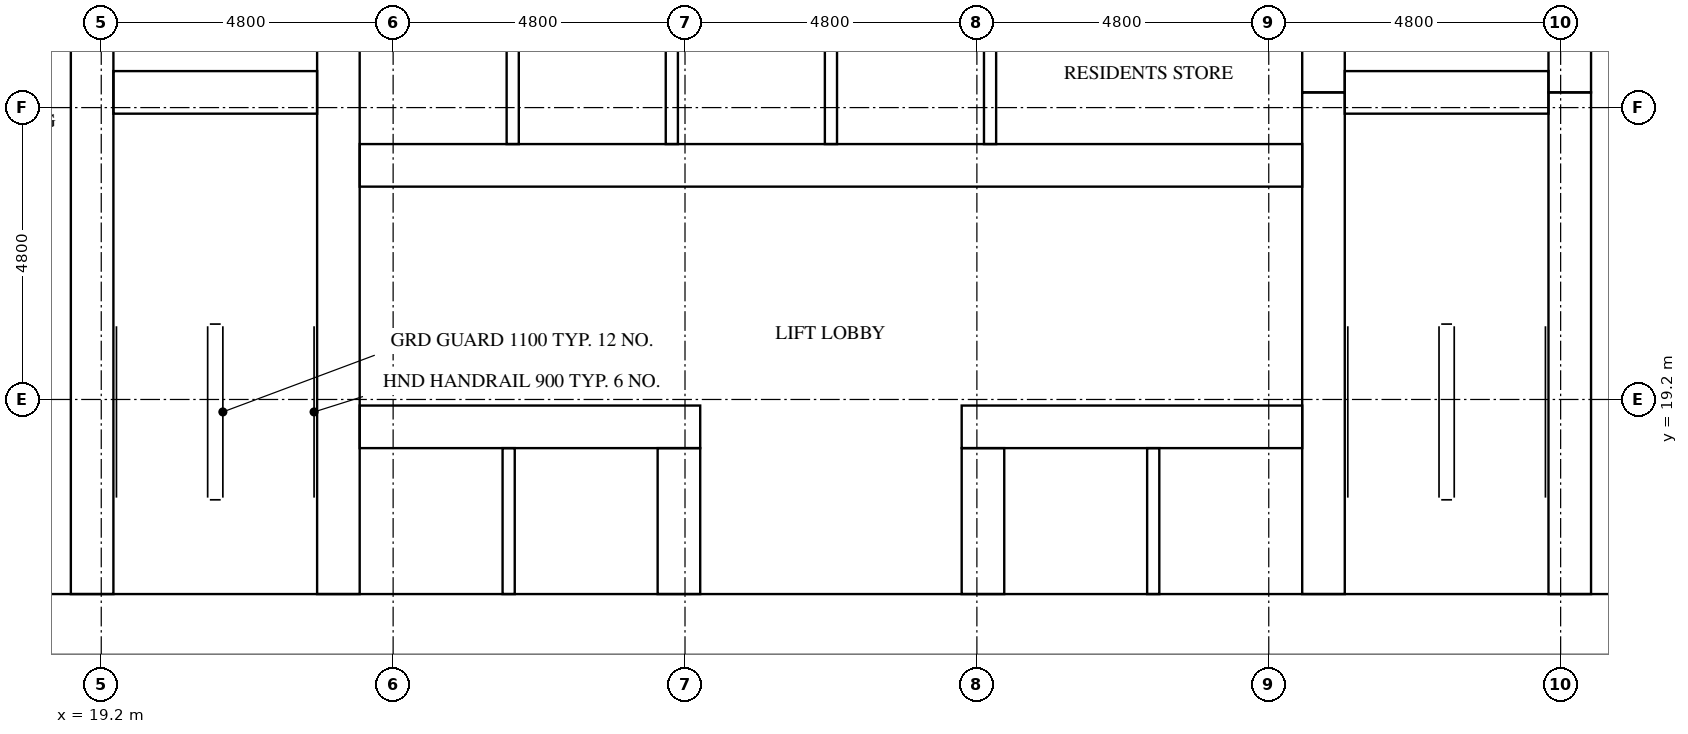
"""IFC4 building model, lengths in metres.
Left out: names, types, materials, properties, quantities, classifications, styles, units other than length and angle.
Written with IfcOpenShell. Run it as: python <this file> out.ifc"""

import sys

from ifc_helpers import new_model, si_unit, direction, frame, frame_2d, origin, place, context, subcontext, project, spatial, rectangle, extrude, element, fill, save


model = new_model("IFC4")
c1 = context("Model", 3, precision=1e-05, world=origin(), true_north=direction((0.0, 1.0)))
c2 = subcontext(c1, "Body", "Model", "MODEL_VIEW")
j1 = project(units=[si_unit("LENGTHUNIT", "METRE"), si_unit("PLANEANGLEUNIT", "RADIAN")], contexts=[c1])
p1 = place(None, origin())
s1 = spatial("IfcSite", under=j1, at=p1, CompositionType="ELEMENT")
p2 = place(p1, origin())
s2 = spatial("IfcBuilding", under=s1, at=p2, CompositionType="ELEMENT")
p3 = place(p2, frame((0.0, 0.0, 29.4)))
s3 = spatial("IfcBuildingStorey", under=s2, at=p3, CompositionType="ELEMENT", Elevation=29.4)
p4 = place(p3, frame((15.0, 15.5, 0.0), z_axis=(0.0, 0.0, 1.0), x_axis=(1.0, 0.0, 0.0)))
e1 = element("IfcWall", 1, at=p4, inside=s3, PredefinedType="SHEAR", context=c2, shape_type="SweptSolid", body=[
    extrude(rectangle(XDim=32.4, YDim=1.0, at=frame_2d((16.2, 0.0))), origin(), (0.0, 0.0, 1.0), 3.2),
])
p5 = place(p4, frame((15.3, 0.0, 0.0)))
e2 = element("IfcOpeningElement", 2, at=p5, cuts=e1, PredefinedType="OPENING", context=c2, shape_type="SweptSolid", body=[
    extrude(rectangle(XDim=1.8, YDim=2.1, at=frame_2d((0.9, 1.05))), frame((0.0, 0.51, 0.0), z_axis=(0.0, -1.0, 0.0), x_axis=(1.0, 0.0, 0.0)), (0.0, 0.0, 1.0), 1.02),
])
p6 = place(p3, frame((19.05, 16.0, 0.0), z_axis=(0.0, 0.0, 1.0), x_axis=(0.0, 1.0, 0.0)))
e3 = element("IfcWall", 3, at=p6, inside=s3, PredefinedType="SHEAR", context=c2, shape_type="SweptSolid", body=[
    extrude(rectangle(XDim=14.9, YDim=0.7, at=frame_2d((7.45, 0.0))), origin(), (0.0, 0.0, 1.0), 3.2),
])
p7 = place(p6, frame((9.45, 0.0, 0.0)))
e4 = element("IfcOpeningElement", 4, at=p7, cuts=e3, PredefinedType="OPENING", context=c2, shape_type="SweptSolid", body=[
    extrude(rectangle(XDim=1.1, YDim=2.1, at=frame_2d((0.55, 1.05))), frame((0.0, 0.36, 0.0), z_axis=(0.0, -1.0, 0.0), x_axis=(1.0, 0.0, 0.0)), (0.0, 0.0, 1.0), 0.72),
])
p8 = place(p6, frame((12.95, 0.0, 0.0)))
e5 = element("IfcOpeningElement", 5, at=p8, cuts=e3, PredefinedType="OPENING", context=c2, shape_type="SweptSolid", body=[
    extrude(rectangle(XDim=1.1, YDim=2.1, at=frame_2d((0.55, 1.05))), frame((0.0, 0.36, 0.0), z_axis=(0.0, -1.0, 0.0), x_axis=(1.0, 0.0, 0.0)), (0.0, 0.0, 1.0), 0.72),
])
p9 = place(p6, frame((0.2, 0.0, 0.0)))
e6 = element("IfcOpeningElement", 6, at=p9, cuts=e3, PredefinedType="OPENING", context=c2, shape_type="SweptSolid", body=[
    extrude(rectangle(XDim=1.2, YDim=2.1, at=frame_2d((0.6, 1.05))), frame((0.0, 0.36, 0.0), z_axis=(0.0, -1.0, 0.0), x_axis=(1.0, 0.0, 0.0)), (0.0, 0.0, 1.0), 0.72),
])
p10 = place(p3, frame((23.1, 16.0, 0.0), z_axis=(0.0, 0.0, 1.0), x_axis=(0.0, 1.0, 0.0)))
e7 = element("IfcWall", 7, at=p10, inside=s3, PredefinedType="SHEAR", context=c2, shape_type="SweptSolid", body=[
    extrude(rectangle(XDim=20.8, YDim=0.7, at=frame_2d((10.4, 0.0))), origin(), (0.0, 0.0, 1.0), 3.2),
])
p11 = place(p3, frame((39.3, 16.0, 0.0), z_axis=(0.0, 0.0, 1.0), x_axis=(0.0, 1.0, 0.0)))
e8 = element("IfcWall", 8, at=p11, inside=s3, PredefinedType="SHEAR", context=c2, shape_type="SweptSolid", body=[
    extrude(rectangle(XDim=8.25, YDim=0.7, at=frame_2d((4.125, 0.0))), origin(), (0.0, 0.0, 1.0), 3.2),
])
p12 = place(p3, frame((39.3, 24.25, 0.0), z_axis=(0.0, 0.0, 1.0), x_axis=(0.0, 1.0, 0.0)))
e9 = element("IfcWall", 9, at=p12, inside=s3, PredefinedType="SHEAR", context=c2, shape_type="SweptSolid", body=[
    extrude(rectangle(XDim=3.5, YDim=0.7, at=frame_2d((1.75, 0.0))), origin(), (0.0, 0.0, 1.0), 3.2),
])
p13 = place(p3, frame((43.35, 16.0, 0.0), z_axis=(0.0, 0.0, 1.0), x_axis=(0.0, 1.0, 0.0)))
e10 = element("IfcWall", 10, at=p13, inside=s3, PredefinedType="SHEAR", context=c2, shape_type="SweptSolid", body=[
    extrude(rectangle(XDim=8.25, YDim=0.7, at=frame_2d((4.125, 0.0))), origin(), (0.0, 0.0, 1.0), 3.2),
])
p14 = place(p13, frame((0.2, 0.0, 0.0)))
e11 = element("IfcOpeningElement", 11, at=p14, cuts=e10, PredefinedType="OPENING", context=c2, shape_type="SweptSolid", body=[
    extrude(rectangle(XDim=1.2, YDim=2.1, at=frame_2d((0.6, 1.05))), frame((0.0, 0.36, 0.0), z_axis=(0.0, -1.0, 0.0), x_axis=(1.0, 0.0, 0.0)), (0.0, 0.0, 1.0), 0.72),
])
p15 = place(p3, frame((43.35, 24.25, 0.0), z_axis=(0.0, 0.0, 1.0), x_axis=(0.0, 1.0, 0.0)))
e12 = element("IfcWall", 12, at=p15, inside=s3, PredefinedType="SHEAR", context=c2, shape_type="SweptSolid", body=[
    extrude(rectangle(XDim=3.5, YDim=0.7, at=frame_2d((1.75, 0.0))), origin(), (0.0, 0.0, 1.0), 3.2),
])
p16 = place(p15, frame((1.2, 0.0, 0.0)))
e13 = element("IfcOpeningElement", 13, at=p16, cuts=e12, PredefinedType="OPENING", context=c2, shape_type="SweptSolid", body=[
    extrude(rectangle(XDim=1.1, YDim=2.1, at=frame_2d((0.55, 1.05))), frame((0.0, 0.36, 0.0), z_axis=(0.0, -1.0, 0.0), x_axis=(1.0, 0.0, 0.0)), (0.0, 0.0, 1.0), 0.72),
])
for number, where, z_axis, x_axis in (
    (14, (19.4, 24.25, 0.0), (0.0, 0.0, 1.0), (1.0, 0.0, 0.0)),
    (15, (39.65, 24.25, 0.0), (0.0, 0.0, 1.0), (1.0, 0.0, 0.0)),
):
    element("IfcWall", number, at=place(p3, frame(where, z_axis=z_axis, x_axis=x_axis)), inside=s3, PredefinedType="SHEAR", context=c2, shape_type="SweptSolid", body=[
        extrude(rectangle(XDim=3.35, YDim=0.7, at=frame_2d((1.675, 0.0))), origin(), (0.0, 0.0, 1.0), 3.2),
    ])
p17 = place(p3, frame((23.45, 18.75, 0.0), z_axis=(0.0, 0.0, 1.0), x_axis=(1.0, 0.0, 0.0)))
e16 = element("IfcWall", 16, at=p17, inside=s3, PredefinedType="SHEAR", context=c2, shape_type="SweptSolid", body=[
    extrude(rectangle(XDim=5.6, YDim=0.7, at=frame_2d((2.8, 0.0))), origin(), (0.0, 0.0, 1.0), 3.2),
])
p18 = place(p17, frame((0.625, 0.0, 0.0)))
e17 = element("IfcOpeningElement", 17, at=p18, cuts=e16, PredefinedType="OPENING", context=c2, shape_type="SweptSolid", body=[
    extrude(rectangle(XDim=1.1, YDim=2.1, at=frame_2d((0.55, 1.05))), frame((0.0, 0.36, 0.0), z_axis=(0.0, -1.0, 0.0), x_axis=(1.0, 0.0, 0.0)), (0.0, 0.0, 1.0), 0.72),
])
p19 = place(p17, frame((3.175, 0.0, 0.0)))
e18 = element("IfcOpeningElement", 18, at=p19, cuts=e16, PredefinedType="OPENING", context=c2, shape_type="SweptSolid", body=[
    extrude(rectangle(XDim=1.1, YDim=2.1, at=frame_2d((0.55, 1.05))), frame((0.0, 0.36, 0.0), z_axis=(0.0, -1.0, 0.0), x_axis=(1.0, 0.0, 0.0)), (0.0, 0.0, 1.0), 0.72),
])
p20 = place(p3, frame((33.35, 18.75, 0.0), z_axis=(0.0, 0.0, 1.0), x_axis=(1.0, 0.0, 0.0)))
e19 = element("IfcWall", 19, at=p20, inside=s3, PredefinedType="SHEAR", context=c2, shape_type="SweptSolid", body=[
    extrude(rectangle(XDim=5.6, YDim=0.7, at=frame_2d((2.8, 0.0))), origin(), (0.0, 0.0, 1.0), 3.2),
])
p21 = place(p20, frame((1.325, 0.0, 0.0)))
e20 = element("IfcOpeningElement", 20, at=p21, cuts=e19, PredefinedType="OPENING", context=c2, shape_type="SweptSolid", body=[
    extrude(rectangle(XDim=1.1, YDim=2.1, at=frame_2d((0.55, 1.05))), frame((0.0, 0.36, 0.0), z_axis=(0.0, -1.0, 0.0), x_axis=(1.0, 0.0, 0.0)), (0.0, 0.0, 1.0), 0.72),
])
p22 = place(p20, frame((3.875, 0.0, 0.0)))
e21 = element("IfcOpeningElement", 21, at=p22, cuts=e19, PredefinedType="OPENING", context=c2, shape_type="SweptSolid", body=[
    extrude(rectangle(XDim=1.1, YDim=2.1, at=frame_2d((0.55, 1.05))), frame((0.0, 0.36, 0.0), z_axis=(0.0, -1.0, 0.0), x_axis=(1.0, 0.0, 0.0)), (0.0, 0.0, 1.0), 0.72),
])
p23 = place(p3, frame((23.45, 23.05, 0.0), z_axis=(0.0, 0.0, 1.0), x_axis=(1.0, 0.0, 0.0)))
e22 = element("IfcWall", 22, at=p23, inside=s3, PredefinedType="SHEAR", context=c2, shape_type="SweptSolid", body=[
    extrude(rectangle(XDim=15.5, YDim=0.7, at=frame_2d((7.75, 0.0))), origin(), (0.0, 0.0, 1.0), 3.2),
])
p24 = place(p23, frame((0.658, 0.0, 0.0)))
e23 = element("IfcOpeningElement", 23, at=p24, cuts=e22, PredefinedType="OPENING", context=c2, shape_type="SweptSolid", body=[
    extrude(rectangle(XDim=1.1, YDim=2.1, at=frame_2d((0.55, 1.05))), frame((0.0, 0.36, 0.0), z_axis=(0.0, -1.0, 0.0), x_axis=(1.0, 0.0, 0.0)), (0.0, 0.0, 1.0), 0.72),
])
p25 = place(p23, frame((3.275, 0.0, 0.0)))
e24 = element("IfcOpeningElement", 24, at=p25, cuts=e22, PredefinedType="OPENING", context=c2, shape_type="SweptSolid", body=[
    extrude(rectangle(XDim=1.1, YDim=2.1, at=frame_2d((0.55, 1.05))), frame((0.0, 0.36, 0.0), z_axis=(0.0, -1.0, 0.0), x_axis=(1.0, 0.0, 0.0)), (0.0, 0.0, 1.0), 0.72),
])
p26 = place(p23, frame((12.483, 0.0, 0.0)))
e25 = element("IfcOpeningElement", 25, at=p26, cuts=e22, PredefinedType="OPENING", context=c2, shape_type="SweptSolid", body=[
    extrude(rectangle(XDim=1.0, YDim=2.1, at=frame_2d((0.5, 1.05))), frame((0.0, 0.36, 0.0), z_axis=(0.0, -1.0, 0.0), x_axis=(1.0, 0.0, 0.0)), (0.0, 0.0, 1.0), 0.72),
])
for number, where, z_axis, x_axis in (
    (26, (28.7, 16.0, 0.0), (0.0, 0.0, 1.0), (0.0, 1.0, 0.0)),
    (27, (33.7, 16.0, 0.0), (0.0, 0.0, 1.0), (0.0, 1.0, 0.0)),
):
    element("IfcWall", number, at=place(p3, frame(where, z_axis=z_axis, x_axis=x_axis)), inside=s3, PredefinedType="SHEAR", context=c2, shape_type="SweptSolid", body=[
        extrude(rectangle(XDim=2.4, YDim=0.7, at=frame_2d((1.2, 0.0))), origin(), (0.0, 0.0, 1.0), 3.2),
    ])
for number, where, z_axis, x_axis in (
    (28, (25.967, 23.4, 0.0), (0.0, 0.0, 1.0), (0.0, 1.0, 0.0)),
    (29, (28.583, 23.4, 0.0), (0.0, 0.0, 1.0), (0.0, 1.0, 0.0)),
    (30, (31.2, 23.4, 0.0), (0.0, 0.0, 1.0), (0.0, 1.0, 0.0)),
    (31, (33.817, 23.4, 0.0), (0.0, 0.0, 1.0), (0.0, 1.0, 0.0)),
):
    element("IfcWall", number, at=place(p3, frame(where, z_axis=z_axis, x_axis=x_axis)), inside=s3, PredefinedType="SOLIDWALL", context=c2, shape_type="SweptSolid", body=[
        extrude(rectangle(XDim=2.4, YDim=0.2, at=frame_2d((1.2, 0.0))), origin(), (0.0, 0.0, 1.0), 3.2),
    ])
for number, where, z_axis, x_axis in (
    (32, (25.9, 16.0, 0.0), (0.0, 0.0, 1.0), (0.0, 1.0, 0.0)),
    (33, (36.5, 16.0, 0.0), (0.0, 0.0, 1.0), (0.0, 1.0, 0.0)),
):
    element("IfcWall", number, at=place(p3, frame(where, z_axis=z_axis, x_axis=x_axis)), inside=s3, PredefinedType="SOLIDWALL", context=c2, shape_type="SweptSolid", body=[
        extrude(rectangle(XDim=2.4, YDim=0.2, at=frame_2d((1.2, 0.0))), origin(), (0.0, 0.0, 1.0), 3.2),
    ])
p27 = place(p18, origin())
e34 = element("IfcDoor", 34, at=p27, inside=s3, OperationType="DOUBLE_DOOR_SLIDING", PredefinedType="DOOR", context=c2, shape_type="SweptSolid", body=[
    extrude(rectangle(XDim=1.1, YDim=2.1, at=frame_2d((0.55, 1.05))), frame((0.0, 0.025, 0.0), z_axis=(0.0, -1.0, 0.0), x_axis=(1.0, 0.0, 0.0)), (0.0, 0.0, 1.0), 0.05),
])
fill(e17, e34)
p28 = place(p19, origin())
e35 = element("IfcDoor", 35, at=p28, inside=s3, OperationType="DOUBLE_DOOR_SLIDING", PredefinedType="DOOR", context=c2, shape_type="SweptSolid", body=[
    extrude(rectangle(XDim=1.1, YDim=2.1, at=frame_2d((0.55, 1.05))), frame((0.0, 0.025, 0.0), z_axis=(0.0, -1.0, 0.0), x_axis=(1.0, 0.0, 0.0)), (0.0, 0.0, 1.0), 0.05),
])
fill(e18, e35)
p29 = place(p21, origin())
e36 = element("IfcDoor", 36, at=p29, inside=s3, OperationType="DOUBLE_DOOR_SLIDING", PredefinedType="DOOR", context=c2, shape_type="SweptSolid", body=[
    extrude(rectangle(XDim=1.1, YDim=2.1, at=frame_2d((0.55, 1.05))), frame((0.0, 0.025, 0.0), z_axis=(0.0, -1.0, 0.0), x_axis=(1.0, 0.0, 0.0)), (0.0, 0.0, 1.0), 0.05),
])
fill(e20, e36)
p30 = place(p22, origin())
e37 = element("IfcDoor", 37, at=p30, inside=s3, OperationType="DOUBLE_DOOR_SLIDING", PredefinedType="DOOR", context=c2, shape_type="SweptSolid", body=[
    extrude(rectangle(XDim=1.1, YDim=2.1, at=frame_2d((0.55, 1.05))), frame((0.0, 0.025, 0.0), z_axis=(0.0, -1.0, 0.0), x_axis=(1.0, 0.0, 0.0)), (0.0, 0.0, 1.0), 0.05),
])
fill(e21, e37)
p31 = place(p24, origin())
e38 = element("IfcDoor", 38, at=p31, inside=s3, OperationType="DOUBLE_DOOR_SLIDING", PredefinedType="DOOR", context=c2, shape_type="SweptSolid", body=[
    extrude(rectangle(XDim=1.1, YDim=2.1, at=frame_2d((0.55, 1.05))), frame((0.0, 0.025, 0.0), z_axis=(0.0, -1.0, 0.0), x_axis=(1.0, 0.0, 0.0)), (0.0, 0.0, 1.0), 0.05),
])
fill(e23, e38)
p32 = place(p25, origin())
e39 = element("IfcDoor", 39, at=p32, inside=s3, OperationType="DOUBLE_DOOR_SLIDING", PredefinedType="DOOR", context=c2, shape_type="SweptSolid", body=[
    extrude(rectangle(XDim=1.1, YDim=2.1, at=frame_2d((0.55, 1.05))), frame((0.0, 0.025, 0.0), z_axis=(0.0, -1.0, 0.0), x_axis=(1.0, 0.0, 0.0)), (0.0, 0.0, 1.0), 0.05),
])
fill(e24, e39)
p33 = place(p9, frame((1.2, 0.0, 0.0), z_axis=(0.0, 0.0, 1.0), x_axis=(-1.0, 0.0, 0.0)))
e40 = element("IfcDoor", 40, at=p33, inside=s3, OperationType="SINGLE_SWING_RIGHT", PredefinedType="DOOR", context=c2, shape_type="SweptSolid", body=[
    extrude(rectangle(XDim=1.2, YDim=2.1, at=frame_2d((0.6, 1.05))), frame((0.0, 0.025, 0.0), z_axis=(0.0, -1.0, 0.0), x_axis=(1.0, 0.0, 0.0)), (0.0, 0.0, 1.0), 0.05),
])
fill(e6, e40)
p34 = place(p14, origin())
e41 = element("IfcDoor", 41, at=p34, inside=s3, OperationType="SINGLE_SWING_LEFT", PredefinedType="DOOR", context=c2, shape_type="SweptSolid", body=[
    extrude(rectangle(XDim=1.2, YDim=2.1, at=frame_2d((0.6, 1.05))), frame((0.0, 0.025, 0.0), z_axis=(0.0, -1.0, 0.0), x_axis=(1.0, 0.0, 0.0)), (0.0, 0.0, 1.0), 0.05),
])
fill(e11, e41)
p35 = place(p5, frame((1.8, 0.0, 0.0), z_axis=(0.0, 0.0, 1.0), x_axis=(-1.0, 0.0, 0.0)))
e42 = element("IfcDoor", 42, at=p35, inside=s3, OperationType="DOUBLE_DOOR_SINGLE_SWING", PredefinedType="DOOR", context=c2, shape_type="SweptSolid", body=[
    extrude(rectangle(XDim=1.8, YDim=2.1, at=frame_2d((0.9, 1.05))), frame((0.0, 0.025, 0.0), z_axis=(0.0, -1.0, 0.0), x_axis=(1.0, 0.0, 0.0)), (0.0, 0.0, 1.0), 0.05),
])
fill(e2, e42)
p36 = place(p26, frame((1.0, 0.0, 0.0), z_axis=(0.0, 0.0, 1.0), x_axis=(-1.0, 0.0, 0.0)))
e43 = element("IfcDoor", 43, at=p36, inside=s3, OperationType="SINGLE_SWING_LEFT", PredefinedType="DOOR", context=c2, shape_type="SweptSolid", body=[
    extrude(rectangle(XDim=1.0, YDim=2.1, at=frame_2d((0.5, 1.05))), frame((0.0, 0.025, 0.0), z_axis=(0.0, -1.0, 0.0), x_axis=(1.0, 0.0, 0.0)), (0.0, 0.0, 1.0), 0.05),
])
fill(e25, e43)
save(model, sys.argv[1])
